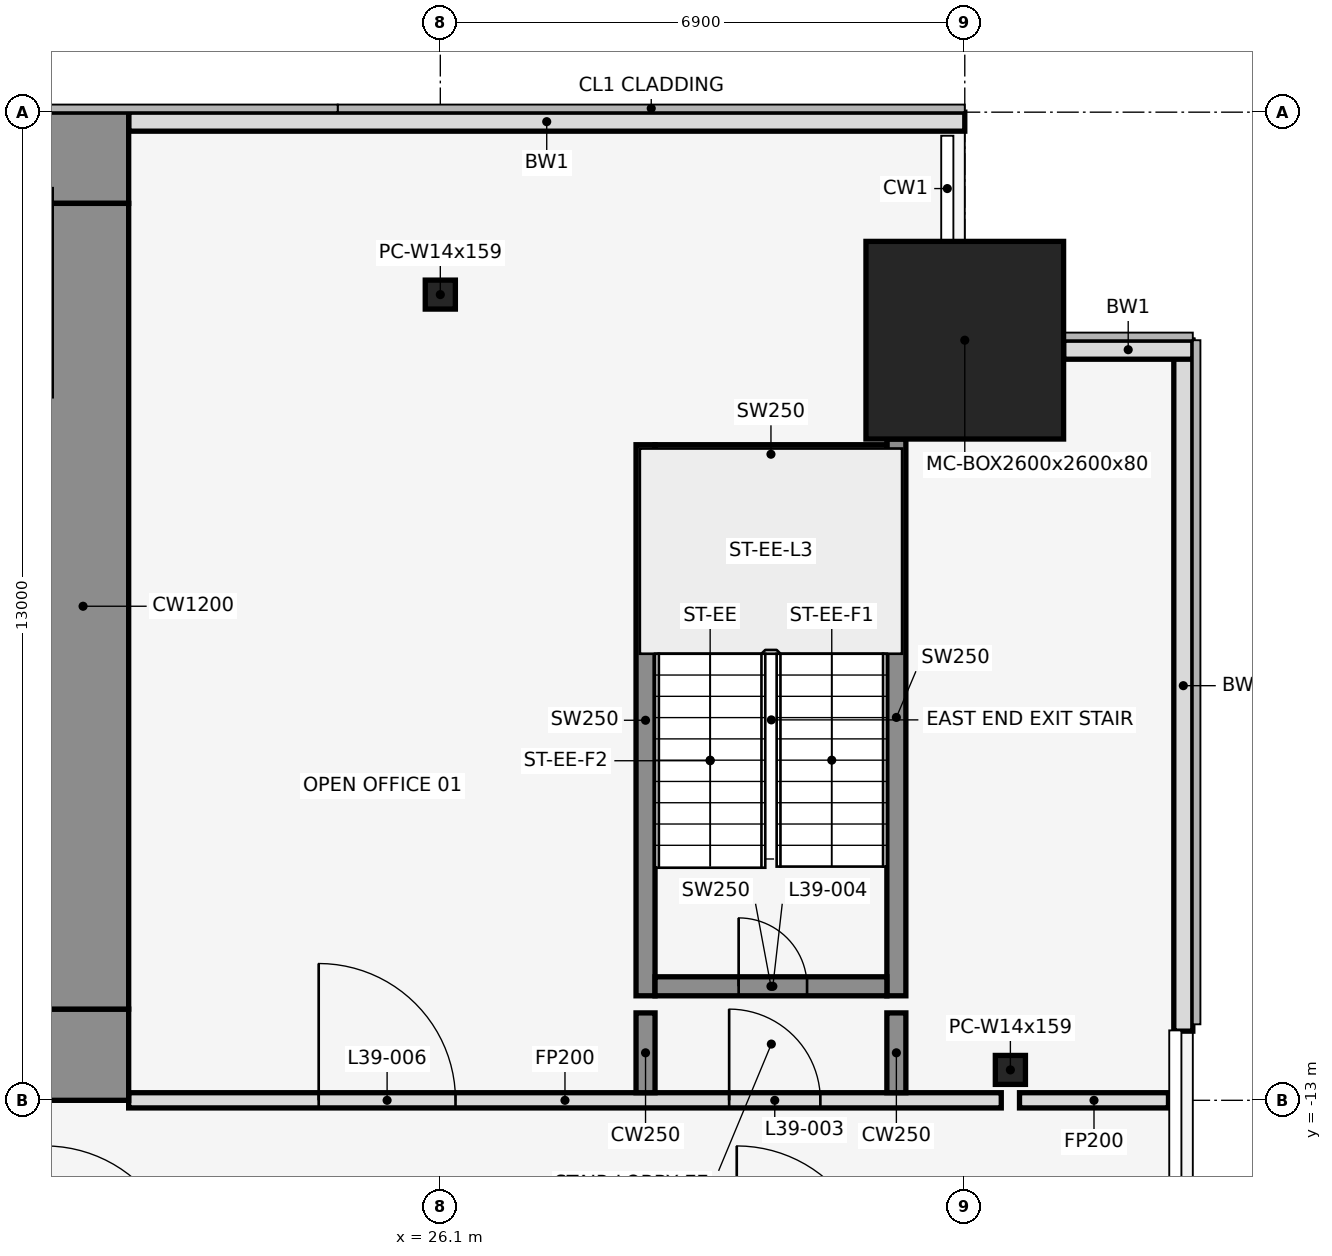
"""IFC4 building model, lengths in metres.
Left out: names, types, materials, properties, quantities, classifications, styles, units other than length and angle.
Written with IfcOpenShell. Run it as: python <this file> out.ifc"""

import sys

from ifc_helpers import new_model, si_unit, direction, frame, frame_2d, origin, origin_2d, place, context, subcontext, project, spatial, rectangle, hollow_rectangle, i_section, extrude, element, fill, save


model = new_model("IFC4")
c1 = context("Model", 3, precision=1e-05, world=origin(), true_north=direction((0.0, 1.0)))
c2 = subcontext(c1, "Body", "Model", "MODEL_VIEW")
j1 = project(units=[si_unit("LENGTHUNIT", "METRE"), si_unit("PLANEANGLEUNIT", "RADIAN")], contexts=[c1])
p1 = place(None, origin())
s1 = spatial("IfcSite", under=j1, at=p1, CompositionType="ELEMENT")
p2 = place(p1, origin())
s2 = spatial("IfcBuilding", under=s1, at=p2, CompositionType="ELEMENT")
p3 = place(p2, frame((0.0, 0.0, 177.3)))
s3 = spatial("IfcBuildingStorey", under=s2, at=p3, CompositionType="ELEMENT", Elevation=177.3)
p4 = place(p3, frame((26.1, -2.4, 0.0), z_axis=(0.0, 0.0, 1.0), x_axis=(1.0, 0.0, 0.0)))
e1 = element("IfcColumn", 1, at=p4, inside=s3, PredefinedType="COLUMN", context=c2, shape_type="SweptSolid", body=[
    extrude(i_section(OverallWidth=0.396, OverallDepth=0.381, WebThickness=0.019, FlangeThickness=0.03, at=origin_2d()), origin(), (0.0, 0.0, 1.0), 4.1),
])
p5 = place(p3, frame((33.0, -3.0, 0.0), z_axis=(0.0, 0.0, 1.0), x_axis=(1.0, 0.0, 0.0)))
e2 = element("IfcColumn", 2, at=p5, inside=s3, PredefinedType="COLUMN", context=c2, shape_type="SweptSolid", body=[
    extrude(hollow_rectangle(XDim=2.6, YDim=2.6, WallThickness=0.08, at=origin_2d()), origin(), (0.0, 0.0, 1.0), 4.1),
])
p6 = place(p3, frame((33.6, -12.6, 0.0), z_axis=(0.0, 0.0, 1.0), x_axis=(1.0, 0.0, 0.0)))
e3 = element("IfcColumn", 3, at=p6, inside=s3, PredefinedType="COLUMN", context=c2, shape_type="SweptSolid", body=[
    extrude(i_section(OverallWidth=0.396, OverallDepth=0.381, WebThickness=0.019, FlangeThickness=0.03, at=origin_2d()), origin(), (0.0, 0.0, 1.0), 4.1),
])
p7 = place(p3, frame((33.0, -0.125, 0.0), z_axis=(0.0, 0.0, 1.0), x_axis=(-1.0, 0.0, 0.0)))
e4 = element("IfcWall", 4, at=p7, inside=s3, PredefinedType="STANDARD", context=c2, shape_type="SweptSolid", body=[
    extrude(rectangle(XDim=11.0, YDim=0.25, at=frame_2d((5.5, 0.0))), origin(), (0.0, 0.0, 1.0), 3.95),
])
p8 = place(p3, frame((35.875, -12.09, 0.0), z_axis=(0.0, 0.0, 1.0), x_axis=(0.0, 1.0, 0.0)))
e5 = element("IfcWall", 5, at=p8, inside=s3, PredefinedType="STANDARD", context=c2, shape_type="SweptSolid", body=[
    extrude(rectangle(XDim=9.09, YDim=0.25, at=frame_2d((4.545, 0.0))), origin(), (0.0, 0.0, 1.0), 3.95),
])
p9 = place(p3, frame((36.0, -3.125, 0.0), z_axis=(0.0, 0.0, 1.0), x_axis=(-1.0, 0.0, 0.0)))
e6 = element("IfcWall", 6, at=p9, inside=s3, PredefinedType="STANDARD", context=c2, shape_type="SweptSolid", body=[
    extrude(rectangle(XDim=1.7, YDim=0.25, at=frame_2d((0.85, 0.0))), origin(), (0.0, 0.0, 1.0), 3.95),
])
p10 = place(p3, frame((28.8, -11.625, 0.0), z_axis=(0.0, 0.0, 1.0), x_axis=(0.0, 1.0, 0.0)))
e7 = element("IfcWall", 7, at=p10, inside=s3, PredefinedType="SHEAR", context=c2, shape_type="SweptSolid", body=[
    extrude(rectangle(XDim=7.25, YDim=0.25, at=frame_2d((3.625, 0.0))), origin(), (0.0, 0.0, 1.0), 4.1),
])
p11 = place(p3, frame((32.1, -11.625, 0.0), z_axis=(0.0, 0.0, 1.0), x_axis=(0.0, 1.0, 0.0)))
e8 = element("IfcWall", 8, at=p11, inside=s3, PredefinedType="SHEAR", context=c2, shape_type="SweptSolid", body=[
    extrude(rectangle(XDim=7.325, YDim=0.25, at=frame_2d((3.663, 0.0))), origin(), (0.0, 0.0, 1.0), 4.1),
])
p12 = place(p3, frame((28.925, -11.5, 0.0), z_axis=(0.0, 0.0, 1.0), x_axis=(1.0, 0.0, 0.0)))
e9 = element("IfcWall", 9, at=p12, inside=s3, PredefinedType="SHEAR", context=c2, shape_type="SweptSolid", body=[
    extrude(rectangle(XDim=3.05, YDim=0.25, at=frame_2d((1.525, 0.0))), origin(), (0.0, 0.0, 1.0), 4.1),
])
p13 = place(p12, frame((1.1, 0.0, 0.0)))
e10 = element("IfcOpeningElement", 10, at=p13, cuts=e9, PredefinedType="OPENING", context=c2, shape_type="SweptSolid", body=[
    extrude(rectangle(XDim=0.9, YDim=2.1, at=frame_2d((0.45, 1.05))), frame((0.0, 0.137, 0.0), z_axis=(0.0, -1.0, 0.0), x_axis=(1.0, 0.0, 0.0)), (0.0, 0.0, 1.0), 0.274),
])
p14 = place(p3, frame((28.925, -4.5, 0.0), z_axis=(0.0, 0.0, 1.0), x_axis=(1.0, 0.0, 0.0)))
e11 = element("IfcWall", 11, at=p14, inside=s3, PredefinedType="SHEAR", context=c2, shape_type="SweptSolid", body=[
    extrude(rectangle(XDim=3.05, YDim=0.25, at=frame_2d((1.525, 0.0))), origin(), (0.0, 0.0, 1.0), 4.1),
])
p15 = place(p3, frame((22.0, -13.0, 0.0), z_axis=(0.0, 0.0, 1.0), x_axis=(1.0, 0.0, 0.0)))
e12 = element("IfcWall", 12, at=p15, inside=s3, PredefinedType="PARTITIONING", context=c2, shape_type="SweptSolid", body=[
    extrude(rectangle(XDim=11.48, YDim=0.2, at=frame_2d((5.74, 0.0))), origin(), (0.0, 0.0, 1.0), 2.84),
])
p16 = place(p15, frame((7.9, 0.0, 0.0)))
e13 = element("IfcOpeningElement", 13, at=p16, cuts=e12, PredefinedType="OPENING", context=c2, shape_type="SweptSolid", body=[
    extrude(rectangle(XDim=1.2, YDim=2.1, at=frame_2d((0.6, 1.05))), frame((0.0, 0.112, 0.0), z_axis=(0.0, -1.0, 0.0), x_axis=(1.0, 0.0, 0.0)), (0.0, 0.0, 1.0), 0.224),
])
p17 = place(p15, frame((2.5, 0.0, 0.0)))
e14 = element("IfcOpeningElement", 14, at=p17, cuts=e12, PredefinedType="OPENING", context=c2, shape_type="SweptSolid", body=[
    extrude(rectangle(XDim=1.8, YDim=2.1, at=frame_2d((0.9, 1.05))), frame((0.0, 0.112, 0.0), z_axis=(0.0, -1.0, 0.0), x_axis=(1.0, 0.0, 0.0)), (0.0, 0.0, 1.0), 0.224),
])
p18 = place(p3, frame((33.72, -13.0, 0.0), z_axis=(0.0, 0.0, 1.0), x_axis=(1.0, 0.0, 0.0)))
e15 = element("IfcWall", 15, at=p18, inside=s3, PredefinedType="PARTITIONING", context=c2, shape_type="SweptSolid", body=[
    extrude(rectangle(XDim=1.96, YDim=0.2, at=frame_2d((0.98, 0.0))), origin(), (0.0, 0.0, 1.0), 2.84),
])
for number, where, z_axis, x_axis in (
    (16, (28.8, -12.9, 0.0), (0.0, 0.0, 1.0), (0.0, 1.0, 0.0)),
    (17, (32.1, -12.9, 0.0), (0.0, 0.0, 1.0), (0.0, 1.0, 0.0)),
):
    element("IfcWall", number, at=place(p3, frame(where, z_axis=z_axis, x_axis=x_axis)), inside=s3, PredefinedType="SHEAR", context=c2, shape_type="SweptSolid", body=[
        extrude(rectangle(XDim=1.05, YDim=0.25, at=frame_2d((0.525, 0.0))), origin(), (0.0, 0.0, 1.0), 4.1),
    ])
p19 = place(p3, frame((-22.0, -0.6, 0.0), z_axis=(0.0, 0.0, 1.0), x_axis=(1.0, 0.0, 0.0)))
e18 = element("IfcWall", 18, at=p19, inside=s3, PredefinedType="SHEAR", context=c2, shape_type="SweptSolid", body=[
    extrude(rectangle(XDim=44.0, YDim=1.2, at=frame_2d((22.0, 0.0))), origin(), (0.0, 0.0, 1.0), 4.1),
])
p20 = place(p19, frame((18.55, 0.0, 0.0)))
e19 = element("IfcOpeningElement", 19, at=p20, cuts=e18, PredefinedType="OPENING", context=c2, shape_type="SweptSolid", body=[
    extrude(rectangle(XDim=0.9, YDim=2.1, at=frame_2d((0.45, 1.05))), frame((0.0, 0.612, 0.0), z_axis=(0.0, -1.0, 0.0), x_axis=(1.0, 0.0, 0.0)), (0.0, 0.0, 1.0), 1.224),
])
p21 = place(p19, frame((24.55, 0.0, 0.0)))
e20 = element("IfcOpeningElement", 20, at=p21, cuts=e18, PredefinedType="OPENING", context=c2, shape_type="SweptSolid", body=[
    extrude(rectangle(XDim=0.9, YDim=2.1, at=frame_2d((0.45, 1.05))), frame((0.0, 0.612, 0.0), z_axis=(0.0, -1.0, 0.0), x_axis=(1.0, 0.0, 0.0)), (0.0, 0.0, 1.0), 1.224),
])
p22 = place(p3, frame((-22.0, -12.4, 0.0), z_axis=(0.0, 0.0, 1.0), x_axis=(1.0, 0.0, 0.0)))
e21 = element("IfcWall", 21, at=p22, inside=s3, PredefinedType="SHEAR", context=c2, shape_type="SweptSolid", body=[
    extrude(rectangle(XDim=44.0, YDim=1.2, at=frame_2d((22.0, 0.0))), origin(), (0.0, 0.0, 1.0), 4.1),
])
p23 = place(p22, frame((2.2, 0.0, 0.0)))
e22 = element("IfcOpeningElement", 22, at=p23, cuts=e21, PredefinedType="OPENING", context=c2, shape_type="SweptSolid", body=[
    extrude(rectangle(XDim=1.2, YDim=2.1, at=frame_2d((0.6, 1.05))), frame((0.0, 0.612, 0.0), z_axis=(0.0, -1.0, 0.0), x_axis=(1.0, 0.0, 0.0)), (0.0, 0.0, 1.0), 1.224),
])
p24 = place(p22, frame((21.4, 0.0, 0.0)))
e23 = element("IfcOpeningElement", 23, at=p24, cuts=e21, PredefinedType="OPENING", context=c2, shape_type="SweptSolid", body=[
    extrude(rectangle(XDim=1.2, YDim=2.1, at=frame_2d((0.6, 1.05))), frame((0.0, 0.612, 0.0), z_axis=(0.0, -1.0, 0.0), x_axis=(1.0, 0.0, 0.0)), (0.0, 0.0, 1.0), 1.224),
])
p25 = place(p22, frame((40.6, 0.0, 0.0)))
e24 = element("IfcOpeningElement", 24, at=p25, cuts=e21, PredefinedType="OPENING", context=c2, shape_type="SweptSolid", body=[
    extrude(rectangle(XDim=1.2, YDim=2.1, at=frame_2d((0.6, 1.05))), frame((0.0, 0.612, 0.0), z_axis=(0.0, -1.0, 0.0), x_axis=(1.0, 0.0, 0.0)), (0.0, 0.0, 1.0), 1.224),
])
p26 = place(p22, frame((16.0, 0.0, 0.0)))
e25 = element("IfcOpeningElement", 25, at=p26, cuts=e21, PredefinedType="OPENING", context=c2, shape_type="SweptSolid", body=[
    extrude(rectangle(XDim=1.8, YDim=2.1, at=frame_2d((0.9, 1.05))), frame((0.0, 0.612, 0.0), z_axis=(0.0, -1.0, 0.0), x_axis=(1.0, 0.0, 0.0)), (0.0, 0.0, 1.0), 1.224),
])
p27 = place(p22, frame((6.3, 0.0, 0.0)))
e26 = element("IfcOpeningElement", 26, at=p27, cuts=e21, PredefinedType="OPENING", context=c2, shape_type="SweptSolid", body=[
    extrude(rectangle(XDim=1.2, YDim=2.1, at=frame_2d((0.6, 1.05))), frame((0.0, 0.612, 0.0), z_axis=(0.0, -1.0, 0.0), x_axis=(1.0, 0.0, 0.0)), (0.0, 0.0, 1.0), 1.224),
])
p28 = place(p22, frame((26.2, 0.0, 0.0)))
e27 = element("IfcOpeningElement", 27, at=p28, cuts=e21, PredefinedType="OPENING", context=c2, shape_type="SweptSolid", body=[
    extrude(rectangle(XDim=1.8, YDim=2.1, at=frame_2d((0.9, 1.05))), frame((0.0, 0.612, 0.0), z_axis=(0.0, -1.0, 0.0), x_axis=(1.0, 0.0, 0.0)), (0.0, 0.0, 1.0), 1.224),
])
p29 = place(p22, frame((36.5, 0.0, 0.0)))
e28 = element("IfcOpeningElement", 28, at=p29, cuts=e21, PredefinedType="OPENING", context=c2, shape_type="SweptSolid", body=[
    extrude(rectangle(XDim=1.2, YDim=2.1, at=frame_2d((0.6, 1.05))), frame((0.0, 0.612, 0.0), z_axis=(0.0, -1.0, 0.0), x_axis=(1.0, 0.0, 0.0)), (0.0, 0.0, 1.0), 1.224),
])
p30 = place(p3, frame((21.4, -11.8, 0.0), z_axis=(0.0, 0.0, 1.0), x_axis=(0.0, 1.0, 0.0)))
e29 = element("IfcWall", 29, at=p30, inside=s3, PredefinedType="SHEAR", context=c2, shape_type="SweptSolid", body=[
    extrude(rectangle(XDim=10.6, YDim=1.2, at=frame_2d((5.3, 0.0))), origin(), (0.0, 0.0, 1.0), 4.1),
])
p31 = place(p16, origin())
e30 = element("IfcDoor", 30, at=p31, inside=s3, OperationType="SINGLE_SWING_RIGHT", PredefinedType="DOOR", context=c2, shape_type="SweptSolid", body=[
    extrude(rectangle(XDim=1.2, YDim=2.1, at=frame_2d((0.6, 1.05))), frame((0.0, 0.025, 0.0), z_axis=(0.0, -1.0, 0.0), x_axis=(1.0, 0.0, 0.0)), (0.0, 0.0, 1.0), 0.05),
])
fill(e13, e30)
p32 = place(p13, origin())
e31 = element("IfcDoor", 31, at=p32, inside=s3, OperationType="SINGLE_SWING_LEFT", PredefinedType="DOOR", context=c2, shape_type="SweptSolid", body=[
    extrude(rectangle(XDim=0.9, YDim=2.1, at=frame_2d((0.45, 1.05))), frame((0.0, 0.025, 0.0), z_axis=(0.0, -1.0, 0.0), x_axis=(1.0, 0.0, 0.0)), (0.0, 0.0, 1.0), 0.05),
])
fill(e10, e31)
p33 = place(p17, origin())
e32 = element("IfcDoor", 32, at=p33, inside=s3, OperationType="SINGLE_SWING_LEFT", PredefinedType="DOOR", context=c2, shape_type="SweptSolid", body=[
    extrude(rectangle(XDim=1.8, YDim=2.1, at=frame_2d((0.9, 1.05))), frame((0.0, 0.025, 0.0), z_axis=(0.0, -1.0, 0.0), x_axis=(1.0, 0.0, 0.0)), (0.0, 0.0, 1.0), 0.05),
])
fill(e14, e32)
save(model, sys.argv[1])
